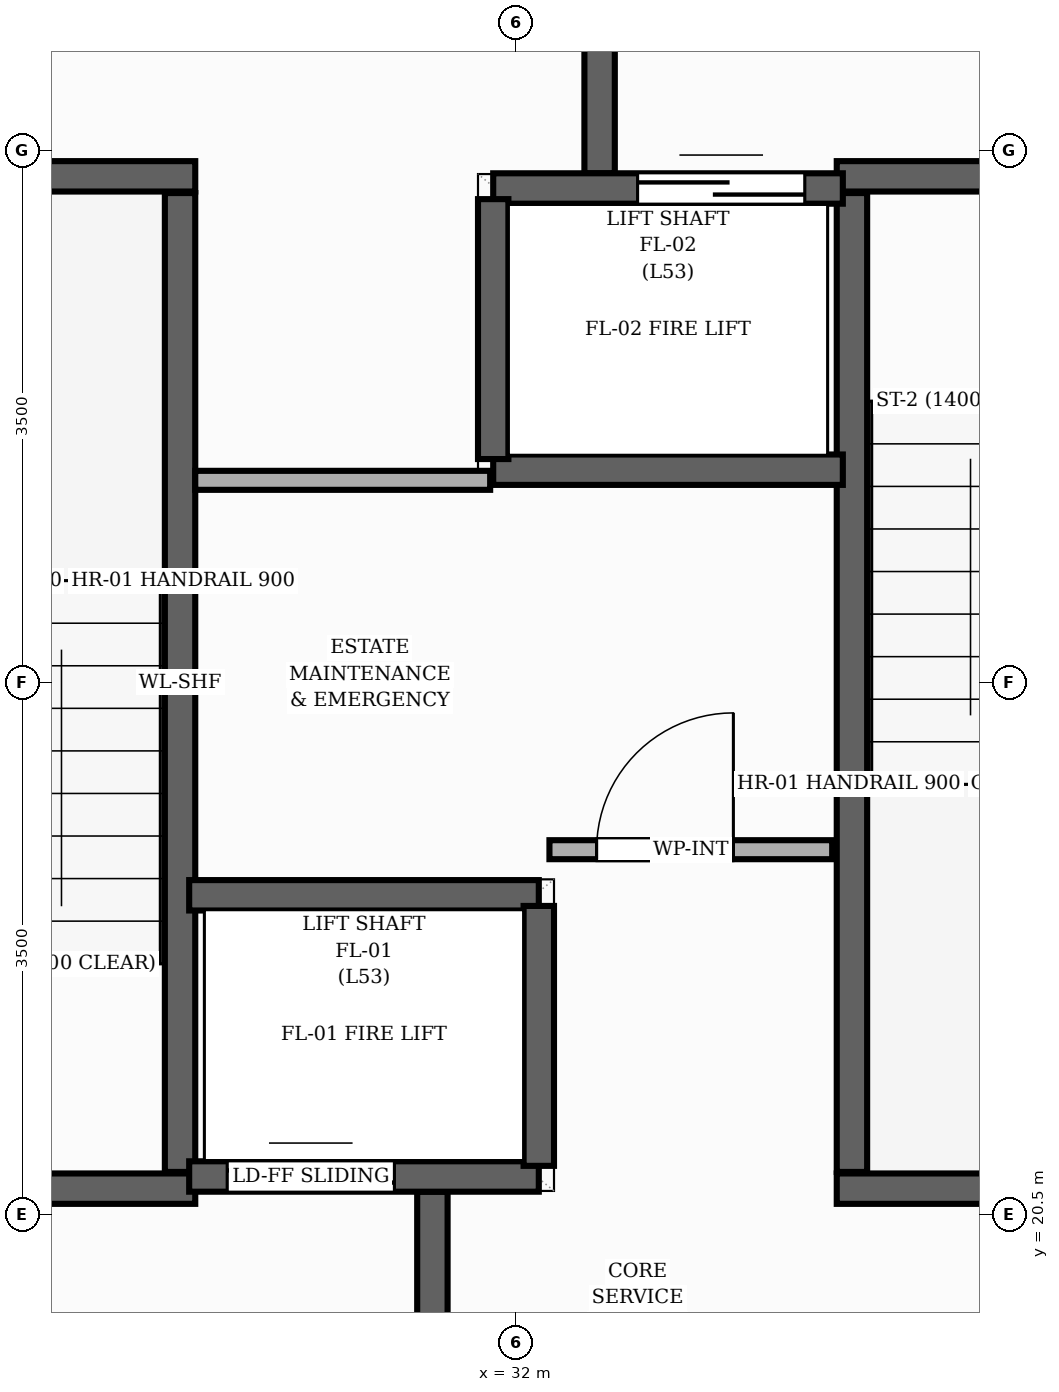
"""IFC4 building model, lengths in metres.
Left out: names, types, materials, properties, quantities, classifications, styles, units other than length and angle.
Written with IfcOpenShell. Run it as: python <this file> out.ifc"""

import sys

from ifc_helpers import new_model, si_unit, direction, frame, frame_2d, origin, place, context, subcontext, project, spatial, rectangle, extrude, element, fill, save


model = new_model("IFC4")
c1 = context("Model", 3, precision=1e-05, world=origin(), true_north=direction((0.0, 1.0)))
c2 = subcontext(c1, "Body", "Model", "MODEL_VIEW")
j1 = project(units=[si_unit("LENGTHUNIT", "METRE"), si_unit("PLANEANGLEUNIT", "RADIAN")], contexts=[c1])
p1 = place(None, origin())
s1 = spatial("IfcSite", under=j1, at=p1, CompositionType="ELEMENT")
p2 = place(p1, origin())
s2 = spatial("IfcBuilding", under=s1, at=p2, CompositionType="ELEMENT")
p3 = place(p2, frame((0.0, 0.0, 175.84)))
s3 = spatial("IfcBuildingStorey", under=s2, at=p3, CompositionType="ELEMENT", Elevation=175.84)
p4 = place(p3, frame((29.79, 20.78, 0.0), z_axis=(0.0, 0.0, 1.0), x_axis=(0.0, 1.0, 0.0)))
e1 = element("IfcWall", 1, at=p4, inside=s3, PredefinedType="SHEAR", context=c2, shape_type="SweptSolid", body=[
    extrude(rectangle(XDim=6.44, YDim=0.2, at=frame_2d((3.22, 0.0))), origin(), (0.0, 0.0, 1.0), 3.2),
])
p5 = place(p3, frame((26.65, 27.33, 0.0), z_axis=(0.0, 0.0, 1.0), x_axis=(1.0, 0.0, 0.0)))
e2 = element("IfcWall", 2, at=p5, inside=s3, PredefinedType="SHEAR", context=c2, shape_type="SweptSolid", body=[
    extrude(rectangle(XDim=3.24, YDim=0.2, at=frame_2d((1.62, 0.0))), origin(), (0.0, 0.0, 1.0), 3.2),
])
p6 = place(p3, frame((26.65, 20.67, 0.0), z_axis=(0.0, 0.0, 1.0), x_axis=(1.0, 0.0, 0.0)))
e3 = element("IfcWall", 3, at=p6, inside=s3, PredefinedType="SHEAR", context=c2, shape_type="SweptSolid", body=[
    extrude(rectangle(XDim=3.24, YDim=0.2, at=frame_2d((1.62, 0.0))), origin(), (0.0, 0.0, 1.0), 3.2),
])
p7 = place(p6, frame((1.055, 0.0, 0.0)))
e4 = element("IfcOpeningElement", 4, at=p7, cuts=e3, PredefinedType="OPENING", context=c2, shape_type="SweptSolid", body=[
    extrude(rectangle(XDim=1.05, YDim=2.15, at=frame_2d((0.525, 1.075))), frame((0.0, 0.11, 0.0), z_axis=(0.0, -1.0, 0.0), x_axis=(1.0, 0.0, 0.0)), (0.0, 0.0, 1.0), 0.22),
])
p8 = place(p3, frame((34.21, 20.78, 0.0), z_axis=(0.0, 0.0, 1.0), x_axis=(0.0, 1.0, 0.0)))
e5 = element("IfcWall", 5, at=p8, inside=s3, PredefinedType="SHEAR", context=c2, shape_type="SweptSolid", body=[
    extrude(rectangle(XDim=6.44, YDim=0.2, at=frame_2d((3.22, 0.0))), origin(), (0.0, 0.0, 1.0), 3.2),
])
p9 = place(p3, frame((34.11, 20.67, 0.0), z_axis=(0.0, 0.0, 1.0), x_axis=(1.0, 0.0, 0.0)))
e6 = element("IfcWall", 6, at=p9, inside=s3, PredefinedType="SHEAR", context=c2, shape_type="SweptSolid", body=[
    extrude(rectangle(XDim=3.24, YDim=0.2, at=frame_2d((1.62, 0.0))), origin(), (0.0, 0.0, 1.0), 3.2),
])
p10 = place(p3, frame((34.11, 27.33, 0.0), z_axis=(0.0, 0.0, 1.0), x_axis=(1.0, 0.0, 0.0)))
e7 = element("IfcWall", 7, at=p10, inside=s3, PredefinedType="SHEAR", context=c2, shape_type="SweptSolid", body=[
    extrude(rectangle(XDim=3.24, YDim=0.2, at=frame_2d((1.62, 0.0))), origin(), (0.0, 0.0, 1.0), 3.2),
])
p11 = place(p10, frame((1.135, 0.0, 0.0)))
e8 = element("IfcOpeningElement", 8, at=p11, cuts=e7, PredefinedType="OPENING", context=c2, shape_type="SweptSolid", body=[
    extrude(rectangle(XDim=1.05, YDim=2.15, at=frame_2d((0.525, 1.075))), frame((0.0, 0.11, 0.0), z_axis=(0.0, -1.0, 0.0), x_axis=(1.0, 0.0, 0.0)), (0.0, 0.0, 1.0), 0.22),
])
for number, where, z_axis, x_axis in (
    (9, (31.45, 17.15, 0.0), (0.0, 0.0, 1.0), (0.0, 1.0, 0.0)),
    (10, (32.55, 27.35, 0.0), (0.0, 0.0, 1.0), (0.0, 1.0, 0.0)),
):
    element("IfcWall", number, at=place(p3, frame(where, z_axis=z_axis, x_axis=x_axis)), inside=s3, PredefinedType="SHEAR", context=c2, shape_type="SweptSolid", body=[
        extrude(rectangle(XDim=3.5, YDim=0.2, at=frame_2d((1.75, 0.0))), origin(), (0.0, 0.0, 1.0), 3.2),
    ])
p12 = place(p3, frame((29.85, 20.75, 0.0), z_axis=(0.0, 0.0, 1.0), x_axis=(1.0, 0.0, 0.0)))
e11 = element("IfcWall", 11, at=p12, inside=s3, PredefinedType="SHEAR", context=c2, shape_type="SweptSolid", body=[
    extrude(rectangle(XDim=2.3, YDim=0.2, at=frame_2d((1.15, 0.0))), origin(), (0.0, 0.0, 1.0), 3.2),
])
p13 = place(p12, frame((0.25, 0.0, 0.0)))
e12 = element("IfcOpeningElement", 12, at=p13, cuts=e11, PredefinedType="OPENING", context=c2, shape_type="SweptSolid", body=[
    extrude(rectangle(XDim=1.1, YDim=2.15, at=frame_2d((0.55, 1.075))), frame((0.0, 0.11, 0.0), z_axis=(0.0, -1.0, 0.0), x_axis=(1.0, 0.0, 0.0)), (0.0, 0.0, 1.0), 0.22),
])
p14 = place(p3, frame((29.85, 22.6, 0.0), z_axis=(0.0, 0.0, 1.0), x_axis=(1.0, 0.0, 0.0)))
e13 = element("IfcWall", 13, at=p14, inside=s3, PredefinedType="SHEAR", context=c2, shape_type="SweptSolid", body=[
    extrude(rectangle(XDim=2.3, YDim=0.2, at=frame_2d((1.15, 0.0))), origin(), (0.0, 0.0, 1.0), 3.2),
])
p15 = place(p3, frame((32.15, 20.82, 0.0), z_axis=(0.0, 0.0, 1.0), x_axis=(0.0, 1.0, 0.0)))
e14 = element("IfcWall", 14, at=p15, inside=s3, PredefinedType="SHEAR", context=c2, shape_type="SweptSolid", body=[
    extrude(rectangle(XDim=1.71, YDim=0.2, at=frame_2d((0.855, 0.0))), origin(), (0.0, 0.0, 1.0), 3.2),
])
p16 = place(p3, frame((31.85, 27.25, 0.0), z_axis=(0.0, 0.0, 1.0), x_axis=(1.0, 0.0, 0.0)))
e15 = element("IfcWall", 15, at=p16, inside=s3, PredefinedType="SHEAR", context=c2, shape_type="SweptSolid", body=[
    extrude(rectangle(XDim=2.3, YDim=0.2, at=frame_2d((1.15, 0.0))), origin(), (0.0, 0.0, 1.0), 3.2),
])
p17 = place(p16, frame((0.95, 0.0, 0.0)))
e16 = element("IfcOpeningElement", 16, at=p17, cuts=e15, PredefinedType="OPENING", context=c2, shape_type="SweptSolid", body=[
    extrude(rectangle(XDim=1.1, YDim=2.15, at=frame_2d((0.55, 1.075))), frame((0.0, 0.11, 0.0), z_axis=(0.0, -1.0, 0.0), x_axis=(1.0, 0.0, 0.0)), (0.0, 0.0, 1.0), 0.22),
])
p18 = place(p3, frame((31.85, 25.4, 0.0), z_axis=(0.0, 0.0, 1.0), x_axis=(1.0, 0.0, 0.0)))
e17 = element("IfcWall", 17, at=p18, inside=s3, PredefinedType="SHEAR", context=c2, shape_type="SweptSolid", body=[
    extrude(rectangle(XDim=2.3, YDim=0.2, at=frame_2d((1.15, 0.0))), origin(), (0.0, 0.0, 1.0), 3.2),
])
p19 = place(p3, frame((31.85, 25.47, 0.0), z_axis=(0.0, 0.0, 1.0), x_axis=(0.0, 1.0, 0.0)))
e18 = element("IfcWall", 18, at=p19, inside=s3, PredefinedType="SHEAR", context=c2, shape_type="SweptSolid", body=[
    extrude(rectangle(XDim=1.71, YDim=0.2, at=frame_2d((0.855, 0.0))), origin(), (0.0, 0.0, 1.0), 3.2),
])
p20 = place(p3, frame((32.22, 22.9, 0.0), z_axis=(0.0, 0.0, 1.0), x_axis=(1.0, 0.0, 0.0)))
e19 = element("IfcWall", 19, at=p20, inside=s3, PredefinedType="PARTITIONING", context=c2, shape_type="SweptSolid", body=[
    extrude(rectangle(XDim=1.86, YDim=0.125, at=frame_2d((0.93, 0.0))), origin(), (0.0, 0.0, 1.0), 2.955),
])
p21 = place(p20, frame((0.31, 0.0, 0.0)))
e20 = element("IfcOpeningElement", 20, at=p21, cuts=e19, PredefinedType="OPENING", context=c2, shape_type="SweptSolid", body=[
    extrude(rectangle(XDim=0.9, YDim=2.1, at=frame_2d((0.45, 1.05))), frame((0.0, 0.073, 0.0), z_axis=(0.0, -1.0, 0.0), x_axis=(1.0, 0.0, 0.0)), (0.0, 0.0, 1.0), 0.145),
])
p22 = place(p3, frame((29.89, 25.33, 0.0), z_axis=(0.0, 0.0, 1.0), x_axis=(1.0, 0.0, 0.0)))
e21 = element("IfcWall", 21, at=p22, inside=s3, PredefinedType="PARTITIONING", context=c2, shape_type="SweptSolid", body=[
    extrude(rectangle(XDim=1.94, YDim=0.125, at=frame_2d((0.97, 0.0))), origin(), (0.0, 0.0, 1.0), 2.955),
])
p23 = place(p13, origin())
e22 = element("IfcDoor", 22, at=p23, inside=s3, OperationType="DOUBLE_DOOR_SLIDING", PredefinedType="DOOR", context=c2, shape_type="SweptSolid", body=[
    extrude(rectangle(XDim=1.1, YDim=2.15, at=frame_2d((0.55, 1.075))), frame((0.0, 0.025, 0.0), z_axis=(0.0, -1.0, 0.0), x_axis=(1.0, 0.0, 0.0)), (0.0, 0.0, 1.0), 0.05),
])
fill(e12, e22)
p24 = place(p17, origin())
e23 = element("IfcDoor", 23, at=p24, inside=s3, OperationType="DOUBLE_DOOR_SLIDING", PredefinedType="DOOR", context=c2, shape_type="SweptSolid", body=[
    extrude(rectangle(XDim=1.1, YDim=2.15, at=frame_2d((0.55, 1.075))), frame((0.0, 0.025, 0.0), z_axis=(0.0, -1.0, 0.0), x_axis=(1.0, 0.0, 0.0)), (0.0, 0.0, 1.0), 0.05),
])
fill(e16, e23)
p25 = place(p21, origin())
e24 = element("IfcDoor", 24, at=p25, inside=s3, OperationType="SINGLE_SWING_RIGHT", PredefinedType="DOOR", context=c2, shape_type="SweptSolid", body=[
    extrude(rectangle(XDim=0.9, YDim=2.1, at=frame_2d((0.45, 1.05))), frame((0.0, 0.025, 0.0), z_axis=(0.0, -1.0, 0.0), x_axis=(1.0, 0.0, 0.0)), (0.0, 0.0, 1.0), 0.05),
])
fill(e20, e24)
save(model, sys.argv[1])
